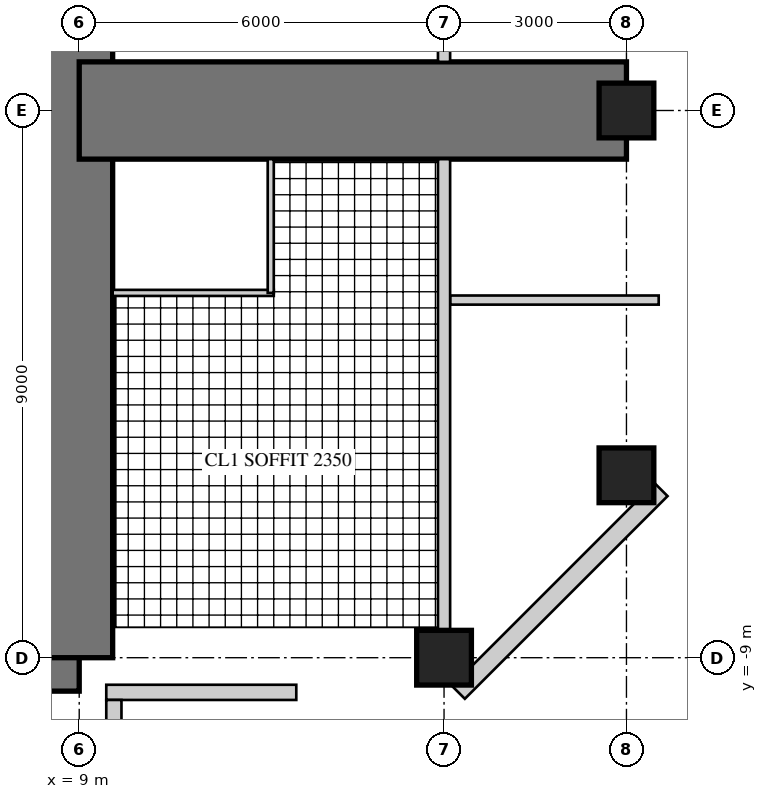
"""IFC4 building model, lengths in metres.
Left out: names, types, materials, properties, quantities, classifications, styles, units other than length and angle.
Written with IfcOpenShell. Run it as: python <this file> out.ifc"""

import sys

from ifc_helpers import new_model, si_unit, direction, frame, frame_2d, origin, origin_2d, place, context, subcontext, project, spatial, rectangle, hollow_rectangle, extrude, element, fill, save


model = new_model("IFC4")
c1 = context("Model", 3, precision=1e-05, world=origin(), true_north=direction((0.0, 1.0)))
c2 = subcontext(c1, "Body", "Model", "MODEL_VIEW")
j1 = project(units=[si_unit("LENGTHUNIT", "METRE"), si_unit("PLANEANGLEUNIT", "RADIAN")], contexts=[c1])
p1 = place(None, origin())
s1 = spatial("IfcSite", under=j1, at=p1, CompositionType="ELEMENT")
p2 = place(p1, origin())
s2 = spatial("IfcBuilding", under=s1, at=p2, CompositionType="ELEMENT")
p3 = place(p2, frame((0.0, 0.0, 172.9)))
s3 = spatial("IfcBuildingStorey", under=s2, at=p3, CompositionType="ELEMENT", Elevation=172.9)
p4 = place(p3, frame((-9.0, -9.0, 0.0), z_axis=(0.0, 0.0, 1.0), x_axis=(1.0, 0.0, 0.0)))
e1 = element("IfcWall", 1, at=p4, inside=s3, PredefinedType="SHEAR", context=c2, shape_type="SweptSolid", body=[
    extrude(rectangle(XDim=18.0, YDim=1.1, at=frame_2d((9.0, 0.0))), origin(), (0.0, 0.0, 1.0), 3.4),
])
p5 = place(p4, frame((9.8, 0.0, 0.0)))
e2 = element("IfcOpeningElement", 2, at=p5, cuts=e1, PredefinedType="OPENING", context=c2, shape_type="SweptSolid", body=[
    extrude(rectangle(XDim=1.0, YDim=2.4, at=frame_2d((0.5, 1.2))), frame((0.0, 0.56, 0.0), z_axis=(0.0, -1.0, 0.0), x_axis=(1.0, 0.0, 0.0)), (0.0, 0.0, 1.0), 1.12),
])
p6 = place(p3, frame((9.0, -9.0, 0.0), z_axis=(0.0, 0.0, 1.0), x_axis=(0.0, 1.0, 0.0)))
e3 = element("IfcWall", 3, at=p6, inside=s3, PredefinedType="SHEAR", context=c2, shape_type="SweptSolid", body=[
    extrude(rectangle(XDim=18.0, YDim=1.1, at=frame_2d((9.0, 0.0))), origin(), (0.0, 0.0, 1.0), 3.4),
])
p7 = place(p6, frame((9.8, 0.0, 0.0)))
e4 = element("IfcOpeningElement", 4, at=p7, cuts=e3, PredefinedType="OPENING", context=c2, shape_type="SweptSolid", body=[
    extrude(rectangle(XDim=1.0, YDim=2.4, at=frame_2d((0.5, 1.2))), frame((0.0, 0.56, 0.0), z_axis=(0.0, -1.0, 0.0), x_axis=(1.0, 0.0, 0.0)), (0.0, 0.0, 1.0), 1.12),
])
p8 = place(p3, frame((9.0, 0.0, 0.0), z_axis=(0.0, 0.0, 1.0), x_axis=(1.0, 0.0, 0.0)))
e5 = element("IfcWall", 5, at=p8, inside=s3, PredefinedType="SHEAR", context=c2, shape_type="SweptSolid", body=[
    extrude(rectangle(XDim=9.0, YDim=1.6, at=frame_2d((4.5, 0.0))), origin(), (0.0, 0.0, 1.0), 3.4),
])
p9 = place(p8, frame((3.95, 0.0, 0.0)))
e6 = element("IfcOpeningElement", 6, at=p9, cuts=e5, PredefinedType="OPENING", context=c2, shape_type="SweptSolid", body=[
    extrude(rectangle(XDim=1.0, YDim=2.15, at=frame_2d((0.5, 1.075))), frame((0.0, 0.81, 0.0), z_axis=(0.0, -1.0, 0.0), x_axis=(1.0, 0.0, 0.0)), (0.0, 0.0, 1.0), 1.62),
])
p10 = place(p8, frame((7.0, 0.0, 0.0)))
e7 = element("IfcOpeningElement", 7, at=p10, cuts=e5, PredefinedType="OPENING", context=c2, shape_type="SweptSolid", body=[
    extrude(rectangle(XDim=1.0, YDim=2.2, at=frame_2d((0.5, 1.1))), frame((0.0, 0.81, 0.0), z_axis=(0.0, -1.0, 0.0), x_axis=(1.0, 0.0, 0.0)), (0.0, 0.0, 1.0), 1.62),
])
for number, where, z_axis, x_axis in (
    (8, (15.0, -9.0, 0.0), (0.0, 0.0, 1.0), (1.0, 0.0, 0.0)),
    (9, (18.0, -6.0, 0.0), (0.0, 0.0, 1.0), (1.0, 0.0, 0.0)),
    (10, (18.0, 0.0, 0.0), (0.0, 0.0, 1.0), (1.0, 0.0, 0.0)),
):
    element("IfcColumn", number, at=place(p3, frame(where, z_axis=z_axis, x_axis=x_axis)), inside=s3, PredefinedType="COLUMN", context=c2, shape_type="SweptSolid", body=[
        extrude(rectangle(XDim=0.9, YDim=0.9, at=origin_2d()), origin(), (0.0, 0.0, 1.0), 3.4),
    ])
p11 = place(p3, frame((9.445, -9.57, 0.0), z_axis=(0.0, 0.0, 1.0), x_axis=(1.0, 0.0, 0.0)))
e11 = element("IfcWall", 11, at=p11, inside=s3, PredefinedType="SOLIDWALL", context=c2, shape_type="SweptSolid", body=[
    extrude(rectangle(XDim=3.125, YDim=0.25, at=frame_2d((1.562, 0.0))), origin(), (0.0, 0.0, 1.0), 3.22),
])
p12 = place(p11, frame((0.6, 0.0, 0.0)))
e12 = element("IfcOpeningElement", 12, at=p12, cuts=e11, PredefinedType="OPENING", context=c2, shape_type="SweptSolid", body=[
    extrude(rectangle(XDim=1.0, YDim=2.2, at=frame_2d((0.5, 1.1))), frame((0.0, 0.135, 0.0), z_axis=(0.0, -1.0, 0.0), x_axis=(1.0, 0.0, 0.0)), (0.0, 0.0, 1.0), 0.27),
])
p13 = place(p3, frame((15.236, -9.57, 0.0), z_axis=(0.0, 0.0, 1.0), x_axis=(0.707106781187, 0.707106781187, 0.0)))
e13 = element("IfcWall", 13, at=p13, inside=s3, PredefinedType="SOLIDWALL", context=c2, shape_type="SweptSolid", body=[
    extrude(rectangle(XDim=4.715, YDim=0.3, at=frame_2d((2.357, 0.0))), origin(), (0.0, 0.0, 1.0), 3.22),
])
p14 = place(p13, frame((1.907, 0.0, 0.3)))
e14 = element("IfcOpeningElement", 14, at=p14, cuts=e13, PredefinedType="OPENING", context=c2, shape_type="SweptSolid", body=[
    extrude(rectangle(XDim=0.9, YDim=2.4, at=frame_2d((0.45, 1.2))), frame((0.0, 0.16, 0.0), z_axis=(0.0, -1.0, 0.0), x_axis=(1.0, 0.0, 0.0)), (0.0, 0.0, 1.0), 0.32),
])
p15 = place(p3, frame((9.57, -12.57, 0.0), z_axis=(0.0, 0.0, 1.0), x_axis=(0.0, 1.0, 0.0)))
e15 = element("IfcWall", 15, at=p15, inside=s3, PredefinedType="SOLIDWALL", context=c2, shape_type="SweptSolid", body=[
    extrude(rectangle(XDim=2.875, YDim=0.25, at=frame_2d((1.438, 0.0))), origin(), (0.0, 0.0, 1.0), 3.22),
])
p16 = place(p15, frame((0.6, 0.0, 0.0)))
e16 = element("IfcOpeningElement", 16, at=p16, cuts=e15, PredefinedType="OPENING", context=c2, shape_type="SweptSolid", body=[
    extrude(rectangle(XDim=1.0, YDim=2.2, at=frame_2d((0.5, 1.1))), frame((0.0, 0.135, 0.0), z_axis=(0.0, -1.0, 0.0), x_axis=(1.0, 0.0, 0.0)), (0.0, 0.0, 1.0), 0.27),
])
p17 = place(p3, frame((9.55, -3.0, 0.0), z_axis=(0.0, 0.0, 1.0), x_axis=(1.0, 0.0, 0.0)))
e17 = element("IfcWall", 17, at=p17, inside=s3, PredefinedType="PARTITIONING", context=c2, shape_type="SweptSolid", body=[
    extrude(rectangle(XDim=2.65, YDim=0.1, at=frame_2d((1.325, 0.0))), origin(), (0.0, 0.0, 1.0), 3.22),
])
p18 = place(p3, frame((12.15, -3.0, 0.0), z_axis=(0.0, 0.0, 1.0), x_axis=(0.0, 1.0, 0.0)))
e18 = element("IfcWall", 18, at=p18, inside=s3, PredefinedType="PARTITIONING", context=c2, shape_type="SweptSolid", body=[
    extrude(rectangle(XDim=2.2, YDim=0.1, at=frame_2d((1.1, 0.0))), origin(), (0.0, 0.0, 1.0), 3.22),
])
p19 = place(p18, frame((0.55, 0.0, 0.0)))
e19 = element("IfcOpeningElement", 19, at=p19, cuts=e18, PredefinedType="OPENING", context=c2, shape_type="SweptSolid", body=[
    extrude(rectangle(XDim=0.9, YDim=2.1, at=frame_2d((0.45, 1.05))), frame((0.0, 0.06, 0.0), z_axis=(0.0, -1.0, 0.0), x_axis=(1.0, 0.0, 0.0)), (0.0, 0.0, 1.0), 0.12),
])
p20 = place(p3, frame((15.1, -3.118, 0.0), z_axis=(0.0, 0.0, 1.0), x_axis=(1.0, 0.0, 0.0)))
e20 = element("IfcWall", 20, at=p20, inside=s3, PredefinedType="PARTITIONING", context=c2, shape_type="SweptSolid", body=[
    extrude(rectangle(XDim=3.43, YDim=0.15, at=frame_2d((1.715, 0.0))), origin(), (0.0, 0.0, 1.0), 3.22),
])
p21 = place(p20, frame((0.6, 0.0, 0.0)))
e21 = element("IfcOpeningElement", 21, at=p21, cuts=e20, PredefinedType="OPENING", context=c2, shape_type="SweptSolid", body=[
    extrude(rectangle(XDim=1.0, YDim=2.1, at=frame_2d((0.5, 1.05))), frame((0.0, 0.085, 0.0), z_axis=(0.0, -1.0, 0.0), x_axis=(1.0, 0.0, 0.0)), (0.0, 0.0, 1.0), 0.17),
])
p22 = place(p3, frame((15.0, -8.55, 0.0), z_axis=(0.0, 0.0, 1.0), x_axis=(0.0, 1.0, 0.0)))
e22 = element("IfcWall", 22, at=p22, inside=s3, PredefinedType="SOLIDWALL", context=c2, shape_type="SweptSolid", body=[
    extrude(rectangle(XDim=7.75, YDim=0.2, at=frame_2d((3.875, 0.0))), origin(), (0.0, 0.0, 1.0), 2.47),
])
p23 = place(p3, frame((15.0, 0.8, 0.0), z_axis=(0.0, 0.0, 1.0), x_axis=(0.0, 1.0, 0.0)))
e23 = element("IfcWall", 23, at=p23, inside=s3, PredefinedType="SOLIDWALL", context=c2, shape_type="SweptSolid", body=[
    extrude(rectangle(XDim=7.75, YDim=0.2, at=frame_2d((3.875, 0.0))), origin(), (0.0, 0.0, 1.0), 2.47),
])
p24 = place(p23, frame((0.35, 0.0, 0.0)))
e24 = element("IfcOpeningElement", 24, at=p24, cuts=e23, PredefinedType="OPENING", context=c2, shape_type="SweptSolid", body=[
    extrude(rectangle(XDim=1.0, YDim=2.2, at=frame_2d((0.5, 1.1))), frame((0.0, 0.11, 0.0), z_axis=(0.0, -1.0, 0.0), x_axis=(1.0, 0.0, 0.0)), (0.0, 0.0, 1.0), 0.22),
])
p25 = place(p12, origin())
e25 = element("IfcDoor", 25, at=p25, inside=s3, OperationType="SINGLE_SWING_LEFT", PredefinedType="DOOR", context=c2, shape_type="SweptSolid", body=[
    extrude(hollow_rectangle(XDim=1.0, YDim=2.2, WallThickness=0.06, at=frame_2d((0.5, 1.1))), frame((0.0, 0.025, 0.0), z_axis=(0.0, -1.0, 0.0), x_axis=(1.0, 0.0, 0.0)), (0.0, 0.0, 1.0), 0.05),
    extrude(rectangle(XDim=0.879, YDim=2.079, at=frame_2d((0.5, 1.1))), frame((0.0, 0.025, 0.0), z_axis=(0.0, -1.0, 0.0), x_axis=(1.0, 0.0, 0.0)), (0.0, 0.0, 1.0), 0.05),
])
fill(e12, e25)
p26 = place(p14, origin())
e26 = element("IfcWindow", 26, at=p26, inside=s3, PartitioningType="SINGLE_PANEL", PredefinedType="WINDOW", context=c2, shape_type="SweptSolid", body=[
    extrude(hollow_rectangle(XDim=0.9, YDim=2.4, WallThickness=0.06, at=frame_2d((0.45, 1.2))), frame((0.0, 0.03, 0.0), z_axis=(0.0, -1.0, 0.0), x_axis=(1.0, 0.0, 0.0)), (0.0, 0.0, 1.0), 0.06),
    extrude(rectangle(XDim=0.779, YDim=2.279, at=frame_2d((0.45, 1.2))), frame((0.0, 0.03, 0.0), z_axis=(0.0, -1.0, 0.0), x_axis=(1.0, 0.0, 0.0)), (0.0, 0.0, 1.0), 0.06),
])
fill(e14, e26)
p27 = place(p19, origin())
e27 = element("IfcDoor", 27, at=p27, inside=s3, OperationType="SINGLE_SWING_LEFT", PredefinedType="DOOR", context=c2, shape_type="SweptSolid", body=[
    extrude(rectangle(XDim=0.9, YDim=2.1, at=frame_2d((0.45, 1.05))), frame((0.0, 0.025, 0.0), z_axis=(0.0, -1.0, 0.0), x_axis=(1.0, 0.0, 0.0)), (0.0, 0.0, 1.0), 0.05),
])
fill(e19, e27)
p28 = place(p21, origin())
e28 = element("IfcDoor", 28, at=p28, inside=s3, OperationType="SINGLE_SWING_LEFT", PredefinedType="DOOR", context=c2, shape_type="SweptSolid", body=[
    extrude(rectangle(XDim=1.0, YDim=2.1, at=frame_2d((0.5, 1.05))), frame((0.0, 0.025, 0.0), z_axis=(0.0, -1.0, 0.0), x_axis=(1.0, 0.0, 0.0)), (0.0, 0.0, 1.0), 0.05),
])
fill(e21, e28)
p29 = place(p9, frame((1.0, 0.0, 0.0), z_axis=(0.0, 0.0, 1.0), x_axis=(-1.0, 0.0, 0.0)))
e29 = element("IfcDoor", 29, at=p29, inside=s3, OperationType="SINGLE_SWING_RIGHT", PredefinedType="DOOR", context=c2, shape_type="SweptSolid", body=[
    extrude(rectangle(XDim=1.0, YDim=2.15, at=frame_2d((0.5, 1.075))), frame((0.0, 0.025, 0.0), z_axis=(0.0, -1.0, 0.0), x_axis=(1.0, 0.0, 0.0)), (0.0, 0.0, 1.0), 0.05),
])
fill(e6, e29)
p30 = place(p10, origin())
e30 = element("IfcDoor", 30, at=p30, inside=s3, OperationType="SINGLE_SWING_LEFT", PredefinedType="DOOR", context=c2, shape_type="SweptSolid", body=[
    extrude(rectangle(XDim=1.0, YDim=2.2, at=frame_2d((0.5, 1.1))), frame((0.0, 0.025, 0.0), z_axis=(0.0, -1.0, 0.0), x_axis=(1.0, 0.0, 0.0)), (0.0, 0.0, 1.0), 0.05),
])
fill(e7, e30)
p31 = place(p7, origin())
e31 = element("IfcDoor", 31, at=p31, inside=s3, OperationType="SINGLE_SWING_RIGHT", PredefinedType="DOOR", context=c2, shape_type="SweptSolid", body=[
    extrude(rectangle(XDim=1.0, YDim=2.4, at=frame_2d((0.5, 1.2))), frame((0.0, 0.055, 0.0), z_axis=(0.0, -1.0, 0.0), x_axis=(1.0, 0.0, 0.0)), (0.0, 0.0, 1.0), 0.05),
])
fill(e4, e31)
save(model, sys.argv[1])
